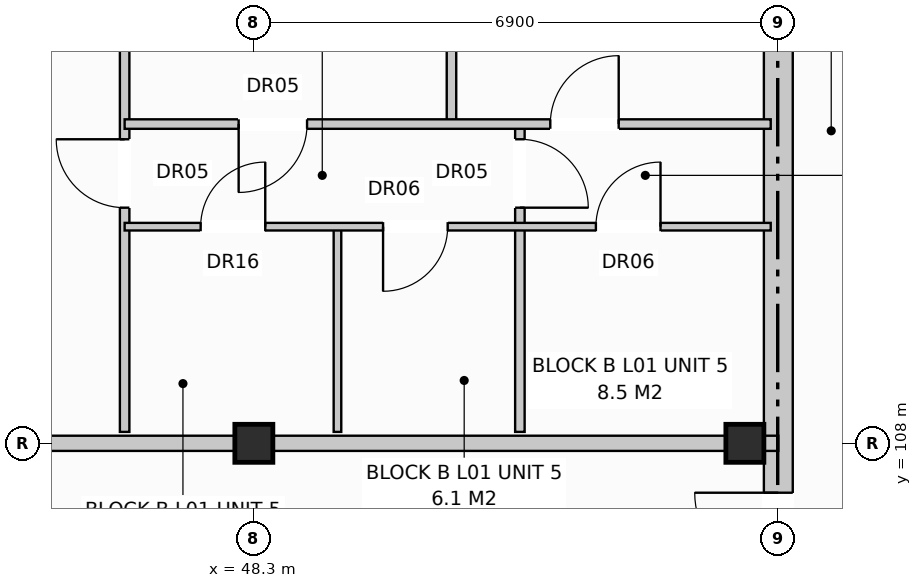
"""IFC4 building model, lengths in metres.
Left out: names, types, materials, properties, quantities, classifications, styles, units other than length and angle.
Written with IfcOpenShell. Run it as: python <this file> out.ifc"""

import sys

from ifc_helpers import new_model, si_unit, direction, frame, frame_2d, origin, origin_with_axes, origin_2d, place, context, subcontext, project, spatial, rectangle, extrude, element, fill, save


model = new_model("IFC4")
c1 = context("Model", 3, precision=1e-05, world=origin(), true_north=direction((0.0, 1.0)))
c2 = subcontext(c1, "Body", "Model", "MODEL_VIEW")
j1 = project(units=[si_unit("LENGTHUNIT", "METRE"), si_unit("PLANEANGLEUNIT", "RADIAN")], contexts=[c1])
p1 = place(None, origin())
s1 = spatial("IfcSite", under=j1, at=p1, CompositionType="ELEMENT")
p2 = place(p1, origin())
s2 = spatial("IfcBuilding", under=s1, at=p2, CompositionType="ELEMENT")
p3 = place(p2, frame((0.0, 0.0, 4.4)))
s3 = spatial("IfcBuildingStorey", under=s2, at=p3, CompositionType="ELEMENT", Elevation=4.4)
for number, where, z_axis, x_axis in (
    (1, (48.3, 108.0, 0.0), (0.0, 0.0, 1.0), (1.0, 0.0, 0.0)),
    (2, (54.76, 108.0, 0.0), (0.0, 0.0, 1.0), (1.0, 0.0, 0.0)),
):
    element("IfcColumn", number, at=place(p3, frame(where, z_axis=z_axis, x_axis=x_axis)), inside=s3, PredefinedType="COLUMN", context=c2, shape_type="SweptSolid", body=[
        extrude(rectangle(XDim=0.5, YDim=0.5, at=origin_2d()), origin(), (0.0, 0.0, 1.0), 3.6),
    ])
p4 = place(p3, frame((55.2, 97.41, 0.0), z_axis=(0.0, 0.0, 1.0), x_axis=(0.0, 1.0, 0.0)))
e3 = element("IfcWall", 3, at=p4, inside=s3, PredefinedType="STANDARD", context=c2, shape_type="SweptSolid", body=[
    extrude(rectangle(XDim=18.78, YDim=0.38, at=frame_2d((9.39, 0.0))), origin(), (0.0, 0.0, 1.0), 3.33),
])
p5 = place(p4, frame((8.84, 0.0, 0.0)))
e4 = element("IfcOpeningElement", 4, at=p5, cuts=e3, PredefinedType="OPENING", context=c2, shape_type="SweptSolid", body=[
    extrude(rectangle(XDim=1.1, YDim=2.1, at=frame_2d((0.55, 1.05))), frame((0.0, 0.202, 0.0), z_axis=(0.0, -1.0, 0.0), x_axis=(1.0, 0.0, 0.0)), (0.0, 0.0, 1.0), 0.404),
])
p6 = place(p4, frame((1.24, 0.0, 0.72)))
e5 = element("IfcOpeningElement", 5, at=p6, cuts=e3, PredefinedType="OPENING", context=c2, shape_type="SweptSolid", body=[
    extrude(rectangle(XDim=2.1, YDim=1.9, at=frame_2d((1.05, 0.95))), frame((0.0, 0.202, 0.0), z_axis=(0.0, -1.0, 0.0), x_axis=(1.0, 0.0, 0.0)), (0.0, 0.0, 1.0), 0.404),
])
p7 = place(p3, frame((41.4, 108.0, 0.0), z_axis=(0.0, 0.0, 1.0), x_axis=(1.0, 0.0, 0.0)))
e6 = element("IfcWall", 6, at=p7, inside=s3, PredefinedType="PARTITIONING", context=c2, shape_type="SweptSolid", body=[
    extrude(rectangle(XDim=13.8, YDim=0.2, at=frame_2d((6.9, 0.0))), origin(), (0.0, 0.0, 1.0), 2.77),
])
p8 = place(p7, frame((2.4, 0.0, 0.0)))
e7 = element("IfcOpeningElement", 7, at=p8, cuts=e6, PredefinedType="OPENING", context=c2, shape_type="SweptSolid", body=[
    extrude(rectangle(XDim=0.95, YDim=2.15, at=frame_2d((0.475, 1.075))), frame((0.0, 0.112, 0.0), z_axis=(0.0, -1.0, 0.0), x_axis=(1.0, 0.0, 0.0)), (0.0, 0.0, 1.0), 0.224),
])
p9 = place(p3, frame((46.6, 108.15, 0.0), z_axis=(0.0, 0.0, 1.0), x_axis=(0.0, 1.0, 0.0)))
e8 = element("IfcWall", 8, at=p9, inside=s3, PredefinedType="PARTITIONING", context=c2, shape_type="SweptSolid", body=[
    extrude(rectangle(XDim=7.65, YDim=0.125, at=frame_2d((3.825, 0.0))), origin(), (0.0, 0.0, 1.0), 3.33),
])
p10 = place(p9, frame((2.95, 0.0, 0.0)))
e9 = element("IfcOpeningElement", 9, at=p10, cuts=e8, PredefinedType="OPENING", context=c2, shape_type="SweptSolid", body=[
    extrude(rectangle(XDim=0.9, YDim=2.1, at=frame_2d((0.45, 1.05))), frame((0.0, 0.074, 0.0), z_axis=(0.0, -1.0, 0.0), x_axis=(1.0, 0.0, 0.0)), (0.0, 0.0, 1.0), 0.149),
])
p11 = place(p3, frame((49.4, 108.15, 0.0), z_axis=(0.0, 0.0, 1.0), x_axis=(0.0, 1.0, 0.0)))
e10 = element("IfcWall", 10, at=p11, inside=s3, PredefinedType="PARTITIONING", context=c2, shape_type="SweptSolid", body=[
    extrude(rectangle(XDim=2.7, YDim=0.1, at=frame_2d((1.35, 0.0))), origin(), (0.0, 0.0, 1.0), 3.33),
])
p12 = place(p3, frame((51.8, 108.15, 0.0), z_axis=(0.0, 0.0, 1.0), x_axis=(0.0, 1.0, 0.0)))
e11 = element("IfcWall", 11, at=p12, inside=s3, PredefinedType="PARTITIONING", context=c2, shape_type="SweptSolid", body=[
    extrude(rectangle(XDim=4.05, YDim=0.125, at=frame_2d((2.025, 0.0))), origin(), (0.0, 0.0, 1.0), 2.99),
])
p13 = place(p12, frame((2.95, 0.0, 0.0)))
e12 = element("IfcOpeningElement", 12, at=p13, cuts=e11, PredefinedType="OPENING", context=c2, shape_type="SweptSolid", body=[
    extrude(rectangle(XDim=0.9, YDim=2.1, at=frame_2d((0.45, 1.05))), frame((0.0, 0.074, 0.0), z_axis=(0.0, -1.0, 0.0), x_axis=(1.0, 0.0, 0.0)), (0.0, 0.0, 1.0), 0.149),
])
p14 = place(p3, frame((50.9, 112.2, 0.0), z_axis=(0.0, 0.0, 1.0), x_axis=(0.0, 1.0, 0.0)))
e13 = element("IfcWall", 13, at=p14, inside=s3, PredefinedType="PARTITIONING", context=c2, shape_type="SweptSolid", body=[
    extrude(rectangle(XDim=3.6, YDim=0.125, at=frame_2d((1.8, 0.0))), origin(), (0.0, 0.0, 1.0), 3.33),
])
p15 = place(p3, frame((46.6, 110.85, 0.0), z_axis=(0.0, 0.0, 1.0), x_axis=(1.0, 0.0, 0.0)))
e14 = element("IfcWall", 14, at=p15, inside=s3, PredefinedType="PARTITIONING", context=c2, shape_type="SweptSolid", body=[
    extrude(rectangle(XDim=8.5, YDim=0.1, at=frame_2d((4.25, 0.0))), origin(), (0.0, 0.0, 1.0), 3.33),
])
p16 = place(p15, frame((1.0, 0.0, 0.0)))
e15 = element("IfcOpeningElement", 15, at=p16, cuts=e14, PredefinedType="OPENING", context=c2, shape_type="SweptSolid", body=[
    extrude(rectangle(XDim=0.85, YDim=2.1, at=frame_2d((0.425, 1.05))), frame((0.0, 0.062, 0.0), z_axis=(0.0, -1.0, 0.0), x_axis=(1.0, 0.0, 0.0)), (0.0, 0.0, 1.0), 0.124),
])
p17 = place(p15, frame((3.4, 0.0, 0.0)))
e16 = element("IfcOpeningElement", 16, at=p17, cuts=e14, PredefinedType="OPENING", context=c2, shape_type="SweptSolid", body=[
    extrude(rectangle(XDim=0.85, YDim=2.05, at=frame_2d((0.425, 1.025))), frame((0.0, 0.062, 0.0), z_axis=(0.0, -1.0, 0.0), x_axis=(1.0, 0.0, 0.0)), (0.0, 0.0, 1.0), 0.124),
])
p18 = place(p15, frame((6.2, 0.0, 0.0)))
e17 = element("IfcOpeningElement", 17, at=p18, cuts=e14, PredefinedType="OPENING", context=c2, shape_type="SweptSolid", body=[
    extrude(rectangle(XDim=0.85, YDim=2.05, at=frame_2d((0.425, 1.025))), frame((0.0, 0.062, 0.0), z_axis=(0.0, -1.0, 0.0), x_axis=(1.0, 0.0, 0.0)), (0.0, 0.0, 1.0), 0.124),
])
p19 = place(p3, frame((46.6, 112.2, 0.0), z_axis=(0.0, 0.0, 1.0), x_axis=(1.0, 0.0, 0.0)))
e18 = element("IfcWall", 18, at=p19, inside=s3, PredefinedType="PARTITIONING", context=c2, shape_type="SweptSolid", body=[
    extrude(rectangle(XDim=8.5, YDim=0.125, at=frame_2d((4.25, 0.0))), origin(), (0.0, 0.0, 1.0), 3.33),
])
p20 = place(p19, frame((1.5, 0.0, 0.0)))
e19 = element("IfcOpeningElement", 19, at=p20, cuts=e18, PredefinedType="OPENING", context=c2, shape_type="SweptSolid", body=[
    extrude(rectangle(XDim=0.9, YDim=2.1, at=frame_2d((0.45, 1.05))), frame((0.0, 0.074, 0.0), z_axis=(0.0, -1.0, 0.0), x_axis=(1.0, 0.0, 0.0)), (0.0, 0.0, 1.0), 0.149),
])
p21 = place(p19, frame((5.6, 0.0, 0.0)))
e20 = element("IfcOpeningElement", 20, at=p21, cuts=e18, PredefinedType="OPENING", context=c2, shape_type="SweptSolid", body=[
    extrude(rectangle(XDim=0.9, YDim=2.1, at=frame_2d((0.45, 1.05))), frame((0.0, 0.074, 0.0), z_axis=(0.0, -1.0, 0.0), x_axis=(1.0, 0.0, 0.0)), (0.0, 0.0, 1.0), 0.149),
])
p22 = place(p5, origin_with_axes())
e21 = element("IfcDoor", 21, at=p22, inside=s3, OperationType="SINGLE_SWING_RIGHT", PredefinedType="DOOR", context=c2, shape_type="SweptSolid", body=[
    extrude(rectangle(XDim=1.1, YDim=2.1, at=frame_2d((0.55, 1.05))), frame((0.0, 0.025, 0.0), z_axis=(0.0, -1.0, 0.0), x_axis=(1.0, 0.0, 0.0)), (0.0, 0.0, 1.0), 0.05),
])
fill(e4, e21)
p23 = place(p10, origin_with_axes())
e22 = element("IfcDoor", 22, at=p23, inside=s3, OperationType="SINGLE_SWING_RIGHT", PredefinedType="DOOR", context=c2, shape_type="SweptSolid", body=[
    extrude(rectangle(XDim=0.9, YDim=2.1, at=frame_2d((0.45, 1.05))), frame((0.0, 0.025, 0.0), z_axis=(0.0, -1.0, 0.0), x_axis=(1.0, 0.0, 0.0)), (0.0, 0.0, 1.0), 0.05),
])
fill(e9, e22)
p24 = place(p13, frame((0.9, 0.0, 0.0), z_axis=(0.0, 0.0, 1.0), x_axis=(-1.0, 0.0, 0.0)))
e23 = element("IfcDoor", 23, at=p24, inside=s3, OperationType="SINGLE_SWING_LEFT", PredefinedType="DOOR", context=c2, shape_type="SweptSolid", body=[
    extrude(rectangle(XDim=0.9, YDim=2.1, at=frame_2d((0.45, 1.05))), frame((0.0, 0.025, 0.0), z_axis=(0.0, -1.0, 0.0), x_axis=(1.0, 0.0, 0.0)), (0.0, 0.0, 1.0), 0.05),
])
fill(e12, e23)
p25 = place(p16, origin_with_axes())
e24 = element("IfcDoor", 24, at=p25, inside=s3, OperationType="SINGLE_SWING_RIGHT", PredefinedType="DOOR", context=c2, shape_type="SweptSolid", body=[
    extrude(rectangle(XDim=0.85, YDim=2.1, at=frame_2d((0.425, 1.05))), frame((0.0, 0.025, 0.0), z_axis=(0.0, -1.0, 0.0), x_axis=(1.0, 0.0, 0.0)), (0.0, 0.0, 1.0), 0.05),
])
fill(e15, e24)
p26 = place(p17, frame((0.85, 0.0, 0.0), z_axis=(0.0, 0.0, 1.0), x_axis=(-1.0, 0.0, 0.0)))
e25 = element("IfcDoor", 25, at=p26, inside=s3, OperationType="SINGLE_SWING_LEFT", PredefinedType="DOOR", context=c2, shape_type="SweptSolid", body=[
    extrude(rectangle(XDim=0.85, YDim=2.05, at=frame_2d((0.425, 1.025))), frame((0.0, 0.025, 0.0), z_axis=(0.0, -1.0, 0.0), x_axis=(1.0, 0.0, 0.0)), (0.0, 0.0, 1.0), 0.05),
])
fill(e16, e25)
p27 = place(p18, origin_with_axes())
e26 = element("IfcDoor", 26, at=p27, inside=s3, OperationType="SINGLE_SWING_RIGHT", PredefinedType="DOOR", context=c2, shape_type="SweptSolid", body=[
    extrude(rectangle(XDim=0.85, YDim=2.05, at=frame_2d((0.425, 1.025))), frame((0.0, 0.025, 0.0), z_axis=(0.0, -1.0, 0.0), x_axis=(1.0, 0.0, 0.0)), (0.0, 0.0, 1.0), 0.05),
])
fill(e17, e26)
p28 = place(p20, frame((0.9, 0.0, 0.0), z_axis=(0.0, 0.0, 1.0), x_axis=(-1.0, 0.0, 0.0)))
e27 = element("IfcDoor", 27, at=p28, inside=s3, OperationType="SINGLE_SWING_LEFT", PredefinedType="DOOR", context=c2, shape_type="SweptSolid", body=[
    extrude(rectangle(XDim=0.9, YDim=2.1, at=frame_2d((0.45, 1.05))), frame((0.0, 0.025, 0.0), z_axis=(0.0, -1.0, 0.0), x_axis=(1.0, 0.0, 0.0)), (0.0, 0.0, 1.0), 0.05),
])
fill(e19, e27)
p29 = place(p21, origin_with_axes())
e28 = element("IfcDoor", 28, at=p29, inside=s3, OperationType="SINGLE_SWING_RIGHT", PredefinedType="DOOR", context=c2, shape_type="SweptSolid", body=[
    extrude(rectangle(XDim=0.9, YDim=2.1, at=frame_2d((0.45, 1.05))), frame((0.0, 0.025, 0.0), z_axis=(0.0, -1.0, 0.0), x_axis=(1.0, 0.0, 0.0)), (0.0, 0.0, 1.0), 0.05),
])
fill(e20, e28)
save(model, sys.argv[1])
